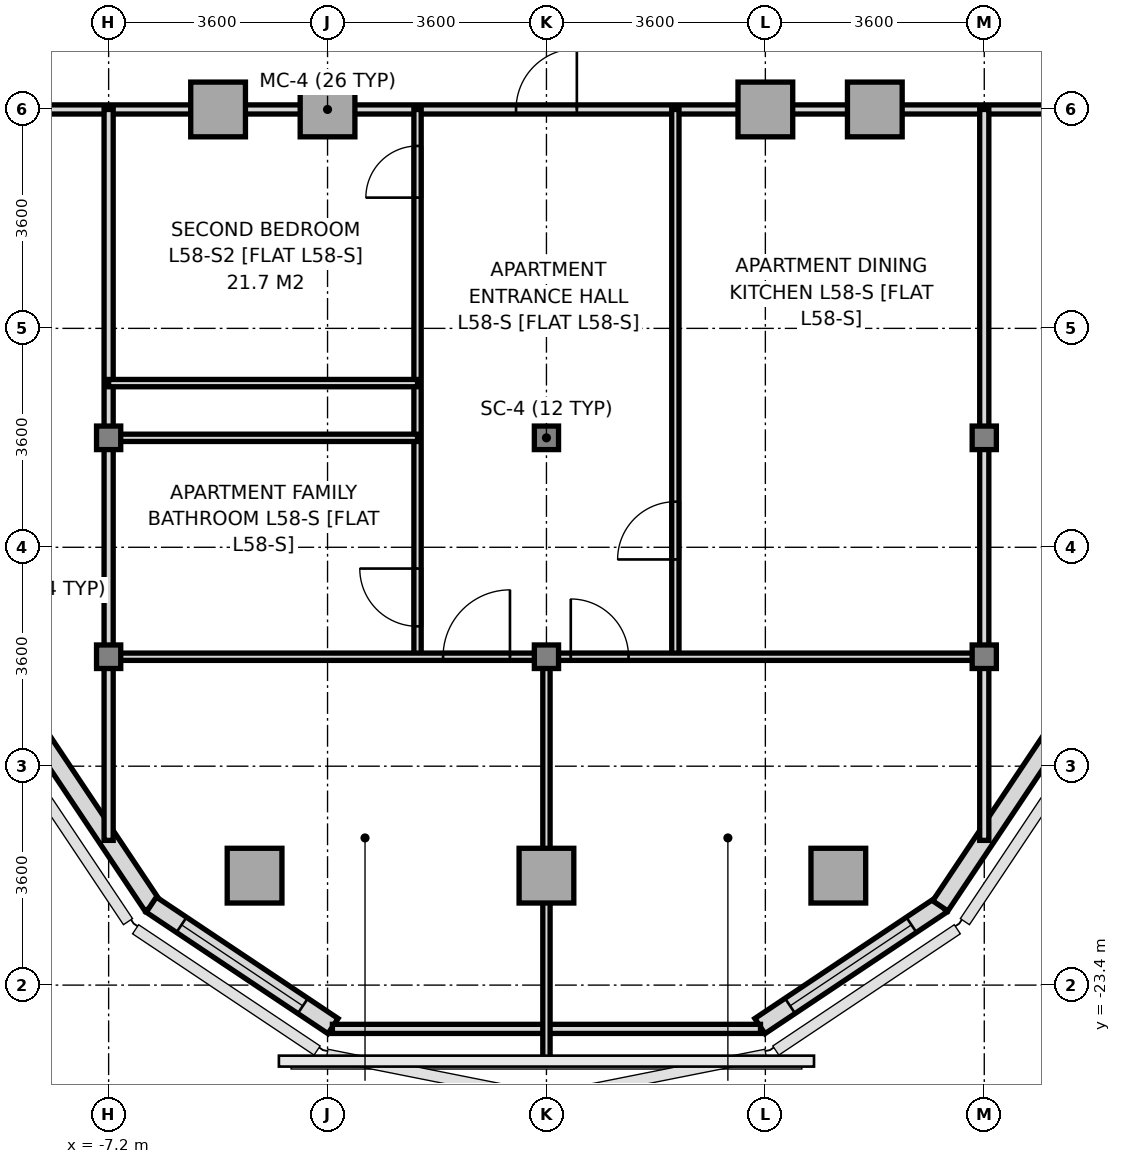
"""IFC4 building model, lengths in metres.
Left out: names, types, materials, properties, quantities, classifications, styles, units other than length and angle.
Written with IfcOpenShell. Run it as: python <this file> out.ifc"""

import sys

from ifc_helpers import new_model, si_unit, direction, frame, frame_2d, origin, origin_2d, place, context, subcontext, project, spatial, rectangle, i_section, extrude, source, transform, mapped, element, fill, save


model = new_model("IFC4")
c1 = context("Model", 3, precision=1e-05, world=origin(), true_north=direction((0.0, 1.0)))
c2 = subcontext(c1, "Body", "Model", "MODEL_VIEW")
j1 = project(units=[si_unit("LENGTHUNIT", "METRE"), si_unit("PLANEANGLEUNIT", "RADIAN")], contexts=[c1])
p1 = place(None, origin())
s1 = spatial("IfcSite", under=j1, at=p1, CompositionType="ELEMENT")
p2 = place(p1, origin())
s2 = spatial("IfcBuilding", under=s1, at=p2, CompositionType="ELEMENT")
p3 = place(p2, frame((0.0, 0.0, 211.4)))
s3 = spatial("IfcBuildingStorey", under=s2, at=p3, CompositionType="ELEMENT", Elevation=211.4)
m1 = source(origin(), c2, "Body", "SweptSolid", [
    extrude(i_section(OverallWidth=0.398, OverallDepth=0.387, WebThickness=0.018, FlangeThickness=0.028, at=origin_2d()), origin(), (0.0, 0.0, 1.0), 3.14),
])
for number, where, z_axis, x_axis in (
    (1, (-7.2, -18.0, 0.0), (0.0, 0.0, 1.0), (1.0, 0.0, 0.0)),
    (2, (-7.2, -14.4, 0.0), (0.0, 0.0, 1.0), (1.0, 0.0, 0.0)),
):
    element("IfcColumn", number, at=place(p3, frame(where, z_axis=z_axis, x_axis=x_axis)), inside=s3, PredefinedType="COLUMN", context=c2, shape_type="MappedRepresentation", body=[
        mapped(m1, transform((0.0, 0.0, 0.0), x_axis=(1.0, 0.0, 0.0), y_axis=(0.0, 1.0, 0.0), z_axis=(0.0, 0.0, 1.0), scale=1.0)),
    ])
m2 = source(origin(), c2, "Body", "SweptSolid", [
    extrude(rectangle(XDim=0.9, YDim=0.9, at=origin_2d()), origin(), (0.0, 0.0, 1.0), 3.14),
])
for number, where, z_axis, x_axis in (
    (3, (-5.4, -9.0, 0.0), (0.0, 0.0, 1.0), (1.0, 0.0, 0.0)),
    (4, (-4.8, -21.6, 0.0), (0.0, 0.0, 1.0), (1.0, 0.0, 0.0)),
    (5, (-3.6, -9.0, 0.0), (0.0, 0.0, 1.0), (1.0, 0.0, 0.0)),
    (6, (0.0, -21.6, 0.0), (0.0, 0.0, 1.0), (1.0, 0.0, 0.0)),
):
    element("IfcColumn", number, at=place(p3, frame(where, z_axis=z_axis, x_axis=x_axis)), inside=s3, PredefinedType="COLUMN", context=c2, shape_type="MappedRepresentation", body=[
        mapped(m2, transform((0.0, 0.0, 0.0), x_axis=(1.0, 0.0, 0.0), y_axis=(0.0, 1.0, 0.0), z_axis=(0.0, 0.0, 1.0), scale=1.0)),
    ])
for number, where, z_axis, x_axis in (
    (7, (0.0, -18.0, 0.0), (0.0, 0.0, 1.0), (1.0, 0.0, 0.0)),
    (8, (0.0, -14.4, 0.0), (0.0, 0.0, 1.0), (1.0, 0.0, 0.0)),
):
    element("IfcColumn", number, at=place(p3, frame(where, z_axis=z_axis, x_axis=x_axis)), inside=s3, PredefinedType="COLUMN", context=c2, shape_type="MappedRepresentation", body=[
        mapped(m1, transform((0.0, 0.0, 0.0), x_axis=(1.0, 0.0, 0.0), y_axis=(0.0, 1.0, 0.0), z_axis=(0.0, 0.0, 1.0), scale=1.0)),
    ])
for number, where, z_axis, x_axis in (
    (9, (3.6, -9.0, 0.0), (0.0, 0.0, 1.0), (1.0, 0.0, 0.0)),
    (10, (4.8, -21.6, 0.0), (0.0, 0.0, 1.0), (1.0, 0.0, 0.0)),
    (11, (5.4, -9.0, 0.0), (0.0, 0.0, 1.0), (1.0, 0.0, 0.0)),
):
    element("IfcColumn", number, at=place(p3, frame(where, z_axis=z_axis, x_axis=x_axis)), inside=s3, PredefinedType="COLUMN", context=c2, shape_type="MappedRepresentation", body=[
        mapped(m2, transform((0.0, 0.0, 0.0), x_axis=(1.0, 0.0, 0.0), y_axis=(0.0, 1.0, 0.0), z_axis=(0.0, 0.0, 1.0), scale=1.0)),
    ])
for number, where, z_axis, x_axis in (
    (12, (7.2, -18.0, 0.0), (0.0, 0.0, 1.0), (1.0, 0.0, 0.0)),
    (13, (7.2, -14.4, 0.0), (0.0, 0.0, 1.0), (1.0, 0.0, 0.0)),
):
    element("IfcColumn", number, at=place(p3, frame(where, z_axis=z_axis, x_axis=x_axis)), inside=s3, PredefinedType="COLUMN", context=c2, shape_type="MappedRepresentation", body=[
        mapped(m1, transform((0.0, 0.0, 0.0), x_axis=(1.0, 0.0, 0.0), y_axis=(0.0, 1.0, 0.0), z_axis=(0.0, 0.0, 1.0), scale=1.0)),
    ])
p4 = place(p3, frame((-8.482, -19.097, 0.0), z_axis=(0.0, 0.0, 1.0), x_axis=(0.555574187116, -0.831466970246, 0.0)))
e14 = element("IfcWall", 14, at=p4, inside=s3, PredefinedType="SOLIDWALL", context=c2, shape_type="SweptSolid", body=[
    extrude(rectangle(XDim=3.609, YDim=0.3, at=frame_2d((1.804, 0.0))), origin(), (0.0, 0.0, 1.0), 3.14),
])
p5 = place(p3, frame((-6.498, -22.077, 0.0), z_axis=(0.0, 0.0, 1.0), x_axis=(0.8314749531, -0.555562239868, 0.0)))
e15 = element("IfcWall", 15, at=p5, inside=s3, PredefinedType="SOLIDWALL", context=c2, shape_type="SweptSolid", body=[
    extrude(rectangle(XDim=3.593, YDim=0.3, at=frame_2d((1.797, 0.0))), origin(), (0.0, 0.0, 1.0), 3.14),
])
p6 = place(p5, frame((0.597, 0.0, 0.8)))
e16 = element("IfcOpeningElement", 16, at=p6, cuts=e15, PredefinedType="OPENING", context=c2, shape_type="SweptSolid", body=[
    extrude(rectangle(XDim=2.4, YDim=2.2, at=frame_2d((1.2, 1.1))), frame((0.0, 0.16, 0.0), z_axis=(0.0, -1.0, 0.0), x_axis=(1.0, 0.0, 0.0)), (0.0, 0.0, 1.0), 0.32),
])
p7 = place(p3, frame((3.51, -24.073, 0.0), z_axis=(0.0, 0.0, 1.0), x_axis=(0.8314749531, 0.555562239868, 0.0)))
e17 = element("IfcWall", 17, at=p7, inside=s3, PredefinedType="SOLIDWALL", context=c2, shape_type="SweptSolid", body=[
    extrude(rectangle(XDim=3.593, YDim=0.3, at=frame_2d((1.797, 0.0))), origin(), (0.0, 0.0, 1.0), 3.14),
])
p8 = place(p7, frame((0.597, 0.0, 0.8)))
e18 = element("IfcOpeningElement", 18, at=p8, cuts=e17, PredefinedType="OPENING", context=c2, shape_type="SweptSolid", body=[
    extrude(rectangle(XDim=2.4, YDim=2.2, at=frame_2d((1.2, 1.1))), frame((0.0, 0.16, 0.0), z_axis=(0.0, -1.0, 0.0), x_axis=(1.0, 0.0, 0.0)), (0.0, 0.0, 1.0), 0.32),
])
p9 = place(p3, frame((6.477, -22.098, 0.0), z_axis=(0.0, 0.0, 1.0), x_axis=(0.555574187116, 0.831466970246, 0.0)))
e19 = element("IfcWall", 19, at=p9, inside=s3, PredefinedType="SOLIDWALL", context=c2, shape_type="SweptSolid", body=[
    extrude(rectangle(XDim=3.609, YDim=0.3, at=frame_2d((1.804, 0.0))), origin(), (0.0, 0.0, 1.0), 3.14),
])
p10 = place(p3, frame((-9.55, -9.0, 0.0), z_axis=(0.0, 0.0, 1.0), x_axis=(1.0, 0.0, 0.0)))
e20 = element("IfcWall", 20, at=p10, inside=s3, PredefinedType="PARTITIONING", context=c2, shape_type="SweptSolid", body=[
    extrude(rectangle(XDim=19.1, YDim=0.15, at=frame_2d((9.55, 0.0))), origin(), (0.0, 0.0, 1.0), 2.69),
])
p11 = place(p10, frame((9.05, 0.0, 0.0)))
e21 = element("IfcOpeningElement", 21, at=p11, cuts=e20, PredefinedType="OPENING", context=c2, shape_type="SweptSolid", body=[
    extrude(rectangle(XDim=1.0, YDim=2.2, at=frame_2d((0.5, 1.1))), frame((0.0, 0.085, 0.0), z_axis=(0.0, -1.0, 0.0), x_axis=(1.0, 0.0, 0.0)), (0.0, 0.0, 1.0), 0.17),
])
for number, where, z_axis, x_axis in (
    (22, (-7.2, -21.02, 0.0), (0.0, 0.0, 1.0), (0.0, 1.0, 0.0)),
    (23, (7.2, -21.02, 0.0), (0.0, 0.0, 1.0), (0.0, 1.0, 0.0)),
):
    element("IfcWall", number, at=place(p3, frame(where, z_axis=z_axis, x_axis=x_axis)), inside=s3, PredefinedType="PARTITIONING", context=c2, shape_type="SweptSolid", body=[
        extrude(rectangle(XDim=12.02, YDim=0.15, at=frame_2d((6.01, 0.0))), origin(), (0.0, 0.0, 1.0), 2.69),
    ])
p12 = place(p3, frame((-3.52, -24.12, 0.0), z_axis=(0.0, 0.0, 1.0), x_axis=(1.0, 0.0, 0.0)))
e24 = element("IfcWall", 24, at=p12, inside=s3, PredefinedType="PARTITIONING", context=c2, shape_type="SweptSolid", body=[
    extrude(rectangle(XDim=7.04, YDim=0.15, at=frame_2d((3.52, 0.0))), origin(), (0.0, 0.0, 1.0), 3.14),
])
p13 = place(p3, frame((-2.12, -18.0, 0.0), z_axis=(0.0, 0.0, 1.0), x_axis=(0.0, 1.0, 0.0)))
e25 = element("IfcWall", 25, at=p13, inside=s3, PredefinedType="PARTITIONING", context=c2, shape_type="SweptSolid", body=[
    extrude(rectangle(XDim=9.0, YDim=0.12, at=frame_2d((4.5, 0.0))), origin(), (0.0, 0.0, 1.0), 2.69),
])
p14 = place(p13, frame((7.55, 0.0, 0.0)))
e26 = element("IfcOpeningElement", 26, at=p14, cuts=e25, PredefinedType="OPENING", context=c2, shape_type="SweptSolid", body=[
    extrude(rectangle(XDim=0.85, YDim=2.1, at=frame_2d((0.425, 1.05))), frame((0.0, 0.07, 0.0), z_axis=(0.0, -1.0, 0.0), x_axis=(1.0, 0.0, 0.0)), (0.0, 0.0, 1.0), 0.14),
])
p15 = place(p13, frame((0.5, 0.0, 0.0)))
e27 = element("IfcOpeningElement", 27, at=p15, cuts=e25, PredefinedType="OPENING", context=c2, shape_type="SweptSolid", body=[
    extrude(rectangle(XDim=0.95, YDim=2.15, at=frame_2d((0.475, 1.075))), frame((0.0, 0.07, 0.0), z_axis=(0.0, -1.0, 0.0), x_axis=(1.0, 0.0, 0.0)), (0.0, 0.0, 1.0), 0.14),
])
p16 = place(p3, frame((-7.2, -13.5, 0.0), z_axis=(0.0, 0.0, 1.0), x_axis=(1.0, 0.0, 0.0)))
e28 = element("IfcWall", 28, at=p16, inside=s3, PredefinedType="PARTITIONING", context=c2, shape_type="SweptSolid", body=[
    extrude(rectangle(XDim=5.08, YDim=0.12, at=frame_2d((2.54, 0.0))), origin(), (0.0, 0.0, 1.0), 3.14),
])
p17 = place(p3, frame((2.12, -18.0, 0.0), z_axis=(0.0, 0.0, 1.0), x_axis=(0.0, 1.0, 0.0)))
e29 = element("IfcWall", 29, at=p17, inside=s3, PredefinedType="PARTITIONING", context=c2, shape_type="SweptSolid", body=[
    extrude(rectangle(XDim=9.0, YDim=0.12, at=frame_2d((4.5, 0.0))), origin(), (0.0, 0.0, 1.0), 2.69),
])
p18 = place(p17, frame((1.6, 0.0, 0.0)))
e30 = element("IfcOpeningElement", 30, at=p18, cuts=e29, PredefinedType="OPENING", context=c2, shape_type="SweptSolid", body=[
    extrude(rectangle(XDim=0.95, YDim=2.15, at=frame_2d((0.475, 1.075))), frame((0.0, 0.07, 0.0), z_axis=(0.0, -1.0, 0.0), x_axis=(1.0, 0.0, 0.0)), (0.0, 0.0, 1.0), 0.14),
])
p19 = place(p3, frame((-7.2, -18.0, 0.0), z_axis=(0.0, 0.0, 1.0), x_axis=(1.0, 0.0, 0.0)))
e31 = element("IfcWall", 31, at=p19, inside=s3, PredefinedType="PARTITIONING", context=c2, shape_type="SweptSolid", body=[
    extrude(rectangle(XDim=14.4, YDim=0.12, at=frame_2d((7.2, 0.0))), origin(), (0.0, 0.0, 1.0), 2.69),
])
p20 = place(p19, frame((5.5, 0.0, 0.0)))
e32 = element("IfcOpeningElement", 32, at=p20, cuts=e31, PredefinedType="OPENING", context=c2, shape_type="SweptSolid", body=[
    extrude(rectangle(XDim=1.1, YDim=2.2, at=frame_2d((0.55, 1.1))), frame((0.0, 0.07, 0.0), z_axis=(0.0, -1.0, 0.0), x_axis=(1.0, 0.0, 0.0)), (0.0, 0.0, 1.0), 0.14),
])
p21 = place(p19, frame((7.6, 0.0, 0.0)))
e33 = element("IfcOpeningElement", 33, at=p21, cuts=e31, PredefinedType="OPENING", context=c2, shape_type="SweptSolid", body=[
    extrude(rectangle(XDim=0.95, YDim=2.15, at=frame_2d((0.475, 1.075))), frame((0.0, 0.07, 0.0), z_axis=(0.0, -1.0, 0.0), x_axis=(1.0, 0.0, 0.0)), (0.0, 0.0, 1.0), 0.14),
])
p22 = place(p3, frame((0.0, -24.65, 0.0), z_axis=(0.0, 0.0, 1.0), x_axis=(0.0, 1.0, 0.0)))
e34 = element("IfcWall", 34, at=p22, inside=s3, PredefinedType="PARTITIONING", context=c2, shape_type="SweptSolid", body=[
    extrude(rectangle(XDim=6.65, YDim=0.12, at=frame_2d((3.325, 0.0))), origin(), (0.0, 0.0, 1.0), 2.69),
])
p23 = place(p3, frame((-7.2, -14.4, 0.0), z_axis=(0.0, 0.0, 1.0), x_axis=(1.0, 0.0, 0.0)))
e35 = element("IfcWall", 35, at=p23, inside=s3, PredefinedType="PARTITIONING", context=c2, shape_type="SweptSolid", body=[
    extrude(rectangle(XDim=5.08, YDim=0.12, at=frame_2d((2.54, 0.0))), origin(), (0.0, 0.0, 1.0), 2.69),
])
m3 = source(origin(), c2, "Body", "SweptSolid", [
    extrude(rectangle(XDim=2.4, YDim=2.2, at=frame_2d((1.2, 1.1))), frame((0.0, 0.03, 0.0), z_axis=(0.0, -1.0, 0.0), x_axis=(1.0, 0.0, 0.0)), (0.0, 0.0, 1.0), 0.06),
])
p24 = place(p6, origin())
e36 = element("IfcWindow", 36, at=p24, inside=s3, PartitioningType="SINGLE_PANEL", PredefinedType="WINDOW", context=c2, shape_type="MappedRepresentation", body=[
    mapped(m3, transform((0.0, 0.0, 0.0), x_axis=(1.0, 0.0, 0.0), y_axis=(0.0, 1.0, 0.0), z_axis=(0.0, 0.0, 1.0), scale=1.0)),
])
fill(e16, e36)
p25 = place(p8, origin())
e37 = element("IfcWindow", 37, at=p25, inside=s3, PartitioningType="SINGLE_PANEL", PredefinedType="WINDOW", context=c2, shape_type="MappedRepresentation", body=[
    mapped(m3, transform((0.0, 0.0, 0.0), x_axis=(1.0, 0.0, 0.0), y_axis=(0.0, 1.0, 0.0), z_axis=(0.0, 0.0, 1.0), scale=1.0)),
])
fill(e18, e37)
m4 = source(origin(), c2, "Body", "SweptSolid", [
    extrude(rectangle(XDim=1.0, YDim=2.2, at=frame_2d((0.5, 1.1))), frame((0.0, 0.025, 0.0), z_axis=(0.0, -1.0, 0.0), x_axis=(1.0, 0.0, 0.0)), (0.0, 0.0, 1.0), 0.05),
])
p26 = place(p11, origin())
e38 = element("IfcDoor", 38, at=p26, inside=s3, OperationType="SINGLE_SWING_RIGHT", PredefinedType="DOOR", context=c2, shape_type="MappedRepresentation", body=[
    mapped(m4, transform((0.0, 0.0, 0.0), x_axis=(1.0, 0.0, 0.0), y_axis=(0.0, 1.0, 0.0), z_axis=(0.0, 0.0, 1.0), scale=1.0)),
])
fill(e21, e38)
m5 = source(origin(), c2, "Body", "SweptSolid", [
    extrude(rectangle(XDim=0.85, YDim=2.1, at=frame_2d((0.425, 1.05))), frame((0.0, 0.025, 0.0), z_axis=(0.0, -1.0, 0.0), x_axis=(1.0, 0.0, 0.0)), (0.0, 0.0, 1.0), 0.05),
])
p27 = place(p14, origin())
e39 = element("IfcDoor", 39, at=p27, inside=s3, OperationType="SINGLE_SWING_LEFT", PredefinedType="DOOR", context=c2, shape_type="MappedRepresentation", body=[
    mapped(m5, transform((0.0, 0.0, 0.0), x_axis=(1.0, 0.0, 0.0), y_axis=(0.0, 1.0, 0.0), z_axis=(0.0, 0.0, 1.0), scale=1.0)),
])
fill(e26, e39)
m6 = source(origin(), c2, "Body", "SweptSolid", [
    extrude(rectangle(XDim=0.95, YDim=2.15, at=frame_2d((0.475, 1.075))), frame((0.0, 0.025, 0.0), z_axis=(0.0, -1.0, 0.0), x_axis=(1.0, 0.0, 0.0)), (0.0, 0.0, 1.0), 0.05),
])
p28 = place(p15, origin())
e40 = element("IfcDoor", 40, at=p28, inside=s3, OperationType="SINGLE_SWING_RIGHT", PredefinedType="DOOR", context=c2, shape_type="MappedRepresentation", body=[
    mapped(m6, transform((0.0, 0.0, 0.0), x_axis=(1.0, 0.0, 0.0), y_axis=(0.0, 1.0, 0.0), z_axis=(0.0, 0.0, 1.0), scale=1.0)),
])
fill(e27, e40)
p29 = place(p18, origin())
e41 = element("IfcDoor", 41, at=p29, inside=s3, OperationType="SINGLE_SWING_LEFT", PredefinedType="DOOR", context=c2, shape_type="MappedRepresentation", body=[
    mapped(m6, transform((0.0, 0.0, 0.0), x_axis=(1.0, 0.0, 0.0), y_axis=(0.0, 1.0, 0.0), z_axis=(0.0, 0.0, 1.0), scale=1.0)),
])
fill(e30, e41)
m7 = source(origin(), c2, "Body", "SweptSolid", [
    extrude(rectangle(XDim=1.1, YDim=2.2, at=frame_2d((0.55, 1.1))), frame((0.0, 0.025, 0.0), z_axis=(0.0, -1.0, 0.0), x_axis=(1.0, 0.0, 0.0)), (0.0, 0.0, 1.0), 0.05),
])
p30 = place(p20, origin())
e42 = element("IfcDoor", 42, at=p30, inside=s3, OperationType="SINGLE_SWING_RIGHT", PredefinedType="DOOR", context=c2, shape_type="MappedRepresentation", body=[
    mapped(m7, transform((0.0, 0.0, 0.0), x_axis=(1.0, 0.0, 0.0), y_axis=(0.0, 1.0, 0.0), z_axis=(0.0, 0.0, 1.0), scale=1.0)),
])
fill(e32, e42)
p31 = place(p21, origin())
e43 = element("IfcDoor", 43, at=p31, inside=s3, OperationType="SINGLE_SWING_LEFT", PredefinedType="DOOR", context=c2, shape_type="MappedRepresentation", body=[
    mapped(m6, transform((0.0, 0.0, 0.0), x_axis=(1.0, 0.0, 0.0), y_axis=(0.0, 1.0, 0.0), z_axis=(0.0, 0.0, 1.0), scale=1.0)),
])
fill(e33, e43)
save(model, sys.argv[1])
